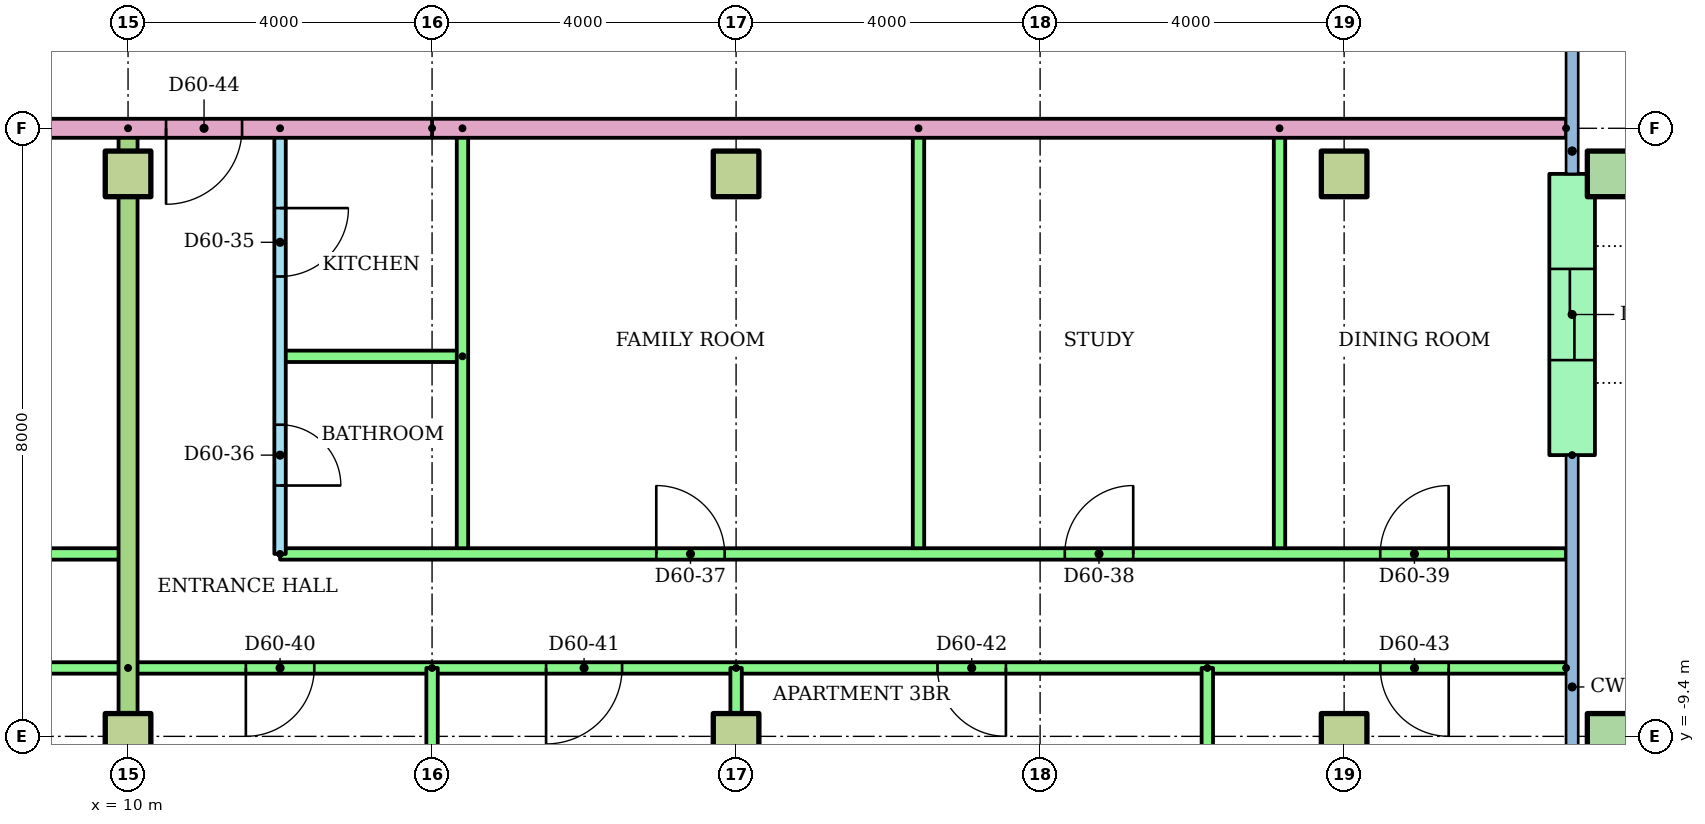
"""IFC4 building model, lengths in metres.
Left out: names, types, materials, properties, quantities, classifications, styles, units other than length and angle.
Written with IfcOpenShell. Run it as: python <this file> out.ifc"""

import sys

from ifc_helpers import new_model, si_unit, direction, frame, frame_2d, origin, origin_2d, place, context, subcontext, project, spatial, rectangle, hollow_rectangle, extrude, element, fill, save


model = new_model("IFC4")
c1 = context("Model", 3, precision=1e-05, world=origin(), true_north=direction((0.0, 1.0)))
c2 = subcontext(c1, "Body", "Model", "MODEL_VIEW")
j1 = project(units=[si_unit("LENGTHUNIT", "METRE"), si_unit("PLANEANGLEUNIT", "RADIAN")], contexts=[c1])
p1 = place(None, origin())
s1 = spatial("IfcSite", under=j1, at=p1, CompositionType="ELEMENT")
p2 = place(p1, origin())
s2 = spatial("IfcBuilding", under=s1, at=p2, CompositionType="ELEMENT")
p3 = place(p2, frame((0.0, 0.0, 230.0)))
s3 = spatial("IfcBuildingStorey", under=s2, at=p3, CompositionType="ELEMENT", Elevation=230.0)
for number, where in (
    (1, (10.0, -9.4, 0.0)),
    (2, (18.0, -9.4, 0.0)),
    (3, (26.0, -9.4, 0.0)),
):
    element("IfcColumn", number, at=place(p3, frame(where)), inside=s3, PredefinedType="COLUMN", context=c2, shape_type="SweptSolid", body=[
        extrude(rectangle(XDim=0.6, YDim=0.6, at=origin_2d()), origin(), (0.0, 0.0, 1.0), 3.2),
    ])
p4 = place(p3, frame((29.5, -9.4, 0.0)))
e4 = element("IfcColumn", 4, at=p4, inside=s3, PredefinedType="COLUMN", context=c2, shape_type="SweptSolid", body=[
    extrude(hollow_rectangle(XDim=0.6, YDim=0.6, WallThickness=0.03, at=origin_2d()), origin(), (0.0, 0.0, 1.0), 3.2),
])
for number, where in (
    (5, (10.0, -2.0, 0.0)),
    (6, (18.0, -2.0, 0.0)),
    (7, (26.0, -2.0, 0.0)),
):
    element("IfcColumn", number, at=place(p3, frame(where)), inside=s3, PredefinedType="COLUMN", context=c2, shape_type="SweptSolid", body=[
        extrude(rectangle(XDim=0.6, YDim=0.6, at=origin_2d()), origin(), (0.0, 0.0, 1.0), 3.2),
    ])
p5 = place(p3, frame((29.5, -2.0, 0.0)))
e8 = element("IfcColumn", 8, at=p5, inside=s3, PredefinedType="COLUMN", context=c2, shape_type="SweptSolid", body=[
    extrude(hollow_rectangle(XDim=0.6, YDim=0.6, WallThickness=0.03, at=origin_2d()), origin(), (0.0, 0.0, 1.0), 3.2),
])
p6 = place(p3, frame((29.0, -5.7, 0.0), z_axis=(0.0, 0.0, 1.0), x_axis=(0.0, 1.0, 0.0)))
e9 = element("IfcWall", 9, at=p6, inside=s3, PredefinedType="STANDARD", context=c2, shape_type="SweptSolid", body=[
    extrude(rectangle(XDim=3.7, YDim=0.6, at=frame_2d((1.85, 0.0))), origin(), (0.0, 0.0, 1.0), 2.92),
])
p7 = place(p6, frame((1.25, 0.0, 0.0)))
e10 = element("IfcOpeningElement", 10, at=p7, cuts=e9, PredefinedType="OPENING", context=c2, shape_type="SweptSolid", body=[
    extrude(rectangle(XDim=1.2, YDim=2.1, at=frame_2d((0.6, 1.05))), frame((0.0, 0.31, 0.0), z_axis=(0.0, -1.0, 0.0), x_axis=(1.0, 0.0, 0.0)), (0.0, 0.0, 1.0), 0.62),
])
p8 = place(p3, frame((-4.0, -7.0, 0.0)))
e11 = element("IfcWall", 11, at=p8, inside=s3, PredefinedType="PARTITIONING", context=c2, shape_type="SweptSolid", body=[
    extrude(rectangle(XDim=14.0, YDim=0.15, at=frame_2d((7.0, 0.0))), origin(), (0.0, 0.0, 1.0), 2.4),
])
p9 = place(p8, frame((4.325, 0.0, 0.0)))
e12 = element("IfcOpeningElement", 12, at=p9, cuts=e11, PredefinedType="OPENING", context=c2, shape_type="SweptSolid", body=[
    extrude(rectangle(XDim=0.9, YDim=2.1, at=frame_2d((0.45, 1.05))), frame((0.0, 0.085, 0.0), z_axis=(0.0, -1.0, 0.0), x_axis=(1.0, 0.0, 0.0)), (0.0, 0.0, 1.0), 0.17),
])
p10 = place(p8, frame((8.575, 0.0, 0.0)))
e13 = element("IfcOpeningElement", 13, at=p10, cuts=e11, PredefinedType="OPENING", context=c2, shape_type="SweptSolid", body=[
    extrude(rectangle(XDim=0.9, YDim=2.1, at=frame_2d((0.45, 1.05))), frame((0.0, 0.085, 0.0), z_axis=(0.0, -1.0, 0.0), x_axis=(1.0, 0.0, 0.0)), (0.0, 0.0, 1.0), 0.17),
])
p11 = place(p8, frame((12.0, 0.0, 0.0)))
e14 = element("IfcOpeningElement", 14, at=p11, cuts=e11, PredefinedType="OPENING", context=c2, shape_type="SweptSolid", body=[
    extrude(rectangle(XDim=0.9, YDim=2.1, at=frame_2d((0.45, 1.05))), frame((0.0, 0.085, 0.0), z_axis=(0.0, -1.0, 0.0), x_axis=(1.0, 0.0, 0.0)), (0.0, 0.0, 1.0), 0.17),
])
p12 = place(p3, frame((10.0, -8.5, 0.0), z_axis=(0.0, 0.0, 1.0), x_axis=(-1.0, 0.0, 0.0)))
e15 = element("IfcWall", 15, at=p12, inside=s3, PredefinedType="PARTITIONING", context=c2, shape_type="SweptSolid", body=[
    extrude(rectangle(XDim=16.0, YDim=0.15, at=frame_2d((8.0, 0.0))), origin(), (0.0, 0.0, 1.0), 2.4),
])
p13 = place(p12, frame((13.55, 0.0, 0.0)))
e16 = element("IfcOpeningElement", 16, at=p13, cuts=e15, PredefinedType="OPENING", context=c2, shape_type="SweptSolid", body=[
    extrude(rectangle(XDim=0.9, YDim=2.1, at=frame_2d((0.45, 1.05))), frame((0.0, 0.085, 0.0), z_axis=(0.0, -1.0, 0.0), x_axis=(1.0, 0.0, 0.0)), (0.0, 0.0, 1.0), 0.17),
])
p14 = place(p12, frame((9.5, 0.0, 0.0)))
e17 = element("IfcOpeningElement", 17, at=p14, cuts=e15, PredefinedType="OPENING", context=c2, shape_type="SweptSolid", body=[
    extrude(rectangle(XDim=1.0, YDim=2.1, at=frame_2d((0.5, 1.05))), frame((0.0, 0.085, 0.0), z_axis=(0.0, -1.0, 0.0), x_axis=(1.0, 0.0, 0.0)), (0.0, 0.0, 1.0), 0.17),
])
p15 = place(p12, frame((5.55, 0.0, 0.0)))
e18 = element("IfcOpeningElement", 18, at=p15, cuts=e15, PredefinedType="OPENING", context=c2, shape_type="SweptSolid", body=[
    extrude(rectangle(XDim=0.9, YDim=2.1, at=frame_2d((0.45, 1.05))), frame((0.0, 0.085, 0.0), z_axis=(0.0, -1.0, 0.0), x_axis=(1.0, 0.0, 0.0)), (0.0, 0.0, 1.0), 0.17),
])
p16 = place(p12, frame((1.55, 0.0, 0.0)))
e19 = element("IfcOpeningElement", 19, at=p16, cuts=e15, PredefinedType="OPENING", context=c2, shape_type="SweptSolid", body=[
    extrude(rectangle(XDim=0.9, YDim=2.1, at=frame_2d((0.45, 1.05))), frame((0.0, 0.085, 0.0), z_axis=(0.0, -1.0, 0.0), x_axis=(1.0, 0.0, 0.0)), (0.0, 0.0, 1.0), 0.17),
])
p17 = place(p3, frame((12.0, -1.4, 0.0), z_axis=(0.0, 0.0, 1.0), x_axis=(0.0, -1.0, 0.0)))
e20 = element("IfcWall", 20, at=p17, inside=s3, PredefinedType="PARTITIONING", context=c2, shape_type="SweptSolid", body=[
    extrude(rectangle(XDim=5.6, YDim=0.15, at=frame_2d((2.8, 0.0))), origin(), (0.0, 0.0, 1.0), 2.4),
])
p18 = place(p17, frame((1.05, 0.0, 0.0)))
e21 = element("IfcOpeningElement", 21, at=p18, cuts=e20, PredefinedType="OPENING", context=c2, shape_type="SweptSolid", body=[
    extrude(rectangle(XDim=0.9, YDim=2.1, at=frame_2d((0.45, 1.05))), frame((0.0, 0.085, 0.0), z_axis=(0.0, -1.0, 0.0), x_axis=(1.0, 0.0, 0.0)), (0.0, 0.0, 1.0), 0.17),
])
p19 = place(p17, frame((3.9, 0.0, 0.0)))
e22 = element("IfcOpeningElement", 22, at=p19, cuts=e20, PredefinedType="OPENING", context=c2, shape_type="SweptSolid", body=[
    extrude(rectangle(XDim=0.8, YDim=2.1, at=frame_2d((0.4, 1.05))), frame((0.0, 0.085, 0.0), z_axis=(0.0, -1.0, 0.0), x_axis=(1.0, 0.0, 0.0)), (0.0, 0.0, 1.0), 0.17),
])
p20 = place(p3, frame((14.4, -4.4, 0.0), z_axis=(0.0, 0.0, 1.0), x_axis=(-1.0, 0.0, 0.0)))
e23 = element("IfcWall", 23, at=p20, inside=s3, PredefinedType="PARTITIONING", context=c2, shape_type="SweptSolid", body=[
    extrude(rectangle(XDim=2.4, YDim=0.15, at=frame_2d((1.2, 0.0))), origin(), (0.0, 0.0, 1.0), 2.4),
])
for number, where, z_axis, x_axis in (
    (24, (14.4, -1.4, 0.0), (0.0, 0.0, 1.0), (0.0, -1.0, 0.0)),
    (25, (20.4, -1.4, 0.0), (0.0, 0.0, 1.0), (0.0, -1.0, 0.0)),
    (26, (25.15, -1.4, 0.0), (0.0, 0.0, 1.0), (0.0, -1.0, 0.0)),
):
    element("IfcWall", number, at=place(p3, frame(where, z_axis=z_axis, x_axis=x_axis)), inside=s3, PredefinedType="PARTITIONING", context=c2, shape_type="SweptSolid", body=[
        extrude(rectangle(XDim=5.6, YDim=0.15, at=frame_2d((2.8, 0.0))), origin(), (0.0, 0.0, 1.0), 2.4),
    ])
p21 = place(p3, frame((12.0, -7.0, 0.0)))
e27 = element("IfcWall", 27, at=p21, inside=s3, PredefinedType="PARTITIONING", context=c2, shape_type="SweptSolid", body=[
    extrude(rectangle(XDim=16.92, YDim=0.15, at=frame_2d((8.46, 0.0))), origin(), (0.0, 0.0, 1.0), 2.4),
])
p22 = place(p21, frame((4.95, 0.0, 0.0)))
e28 = element("IfcOpeningElement", 28, at=p22, cuts=e27, PredefinedType="OPENING", context=c2, shape_type="SweptSolid", body=[
    extrude(rectangle(XDim=0.9, YDim=2.1, at=frame_2d((0.45, 1.05))), frame((0.0, 0.085, 0.0), z_axis=(0.0, -1.0, 0.0), x_axis=(1.0, 0.0, 0.0)), (0.0, 0.0, 1.0), 0.17),
])
p23 = place(p21, frame((10.325, 0.0, 0.0)))
e29 = element("IfcOpeningElement", 29, at=p23, cuts=e27, PredefinedType="OPENING", context=c2, shape_type="SweptSolid", body=[
    extrude(rectangle(XDim=0.9, YDim=2.1, at=frame_2d((0.45, 1.05))), frame((0.0, 0.085, 0.0), z_axis=(0.0, -1.0, 0.0), x_axis=(1.0, 0.0, 0.0)), (0.0, 0.0, 1.0), 0.17),
])
p24 = place(p21, frame((14.475, 0.0, 0.0)))
e30 = element("IfcOpeningElement", 30, at=p24, cuts=e27, PredefinedType="OPENING", context=c2, shape_type="SweptSolid", body=[
    extrude(rectangle(XDim=0.9, YDim=2.1, at=frame_2d((0.45, 1.05))), frame((0.0, 0.085, 0.0), z_axis=(0.0, -1.0, 0.0), x_axis=(1.0, 0.0, 0.0)), (0.0, 0.0, 1.0), 0.17),
])
p25 = place(p3, frame((28.92, -8.5, 0.0), z_axis=(0.0, 0.0, 1.0), x_axis=(-1.0, 0.0, 0.0)))
e31 = element("IfcWall", 31, at=p25, inside=s3, PredefinedType="PARTITIONING", context=c2, shape_type="SweptSolid", body=[
    extrude(rectangle(XDim=18.92, YDim=0.15, at=frame_2d((9.46, 0.0))), origin(), (0.0, 0.0, 1.0), 2.4),
])
p26 = place(p25, frame((16.47, 0.0, 0.0)))
e32 = element("IfcOpeningElement", 32, at=p26, cuts=e31, PredefinedType="OPENING", context=c2, shape_type="SweptSolid", body=[
    extrude(rectangle(XDim=0.9, YDim=2.1, at=frame_2d((0.45, 1.05))), frame((0.0, 0.085, 0.0), z_axis=(0.0, -1.0, 0.0), x_axis=(1.0, 0.0, 0.0)), (0.0, 0.0, 1.0), 0.17),
])
p27 = place(p25, frame((12.42, 0.0, 0.0)))
e33 = element("IfcOpeningElement", 33, at=p27, cuts=e31, PredefinedType="OPENING", context=c2, shape_type="SweptSolid", body=[
    extrude(rectangle(XDim=1.0, YDim=2.1, at=frame_2d((0.5, 1.05))), frame((0.0, 0.085, 0.0), z_axis=(0.0, -1.0, 0.0), x_axis=(1.0, 0.0, 0.0)), (0.0, 0.0, 1.0), 0.17),
])
p28 = place(p25, frame((7.37, 0.0, 0.0)))
e34 = element("IfcOpeningElement", 34, at=p28, cuts=e31, PredefinedType="OPENING", context=c2, shape_type="SweptSolid", body=[
    extrude(rectangle(XDim=0.9, YDim=2.1, at=frame_2d((0.45, 1.05))), frame((0.0, 0.085, 0.0), z_axis=(0.0, -1.0, 0.0), x_axis=(1.0, 0.0, 0.0)), (0.0, 0.0, 1.0), 0.17),
])
p29 = place(p25, frame((1.544, 0.0, 0.0)))
e35 = element("IfcOpeningElement", 35, at=p29, cuts=e31, PredefinedType="OPENING", context=c2, shape_type="SweptSolid", body=[
    extrude(rectangle(XDim=0.9, YDim=2.1, at=frame_2d((0.45, 1.05))), frame((0.0, 0.085, 0.0), z_axis=(0.0, -1.0, 0.0), x_axis=(1.0, 0.0, 0.0)), (0.0, 0.0, 1.0), 0.17),
])
p30 = place(p3, frame((14.0, -8.5, 0.0), z_axis=(0.0, 0.0, 1.0), x_axis=(0.0, -1.0, 0.0)))
e36 = element("IfcWall", 36, at=p30, inside=s3, PredefinedType="PARTITIONING", context=c2, shape_type="SweptSolid", body=[
    extrude(rectangle(XDim=8.021, YDim=0.15, at=frame_2d((4.01, 0.0))), origin(), (0.0, 0.0, 1.0), 2.4),
])
p31 = place(p3, frame((18.0, -8.5, 0.0), z_axis=(0.0, 0.0, 1.0), x_axis=(0.0, -1.0, 0.0)))
e37 = element("IfcWall", 37, at=p31, inside=s3, PredefinedType="PARTITIONING", context=c2, shape_type="SweptSolid", body=[
    extrude(rectangle(XDim=8.01, YDim=0.15, at=frame_2d((4.005, 0.0))), origin(), (0.0, 0.0, 1.0), 2.4),
])
p32 = place(p3, frame((24.2, -8.5, 0.0), z_axis=(0.0, 0.0, 1.0), x_axis=(0.0, -1.0, 0.0)))
e38 = element("IfcWall", 38, at=p32, inside=s3, PredefinedType="PARTITIONING", context=c2, shape_type="SweptSolid", body=[
    extrude(rectangle(XDim=6.22, YDim=0.15, at=frame_2d((3.11, 0.0))), origin(), (0.0, 0.0, 1.0), 2.4),
])
p33 = place(p3, frame((10.0, -1.4, 0.0), z_axis=(0.0, 0.0, 1.0), x_axis=(0.0, -1.0, 0.0)))
e39 = element("IfcWall", 39, at=p33, inside=s3, PredefinedType="PARTITIONING", context=c2, shape_type="SweptSolid", body=[
    extrude(rectangle(XDim=15.11, YDim=0.25, at=frame_2d((7.555, 0.0))), origin(), (0.0, 0.0, 1.0), 2.4),
])
p34 = place(p3, frame((28.92, -1.4, 0.0), z_axis=(0.0, 0.0, 1.0), x_axis=(-1.0, 0.0, 0.0)))
e40 = element("IfcWall", 40, at=p34, inside=s3, PredefinedType="PARTITIONING", context=c2, shape_type="SweptSolid", body=[
    extrude(rectangle(XDim=14.92, YDim=0.25, at=frame_2d((7.46, 0.0))), origin(), (0.0, 0.0, 1.0), 2.4),
])
p35 = place(p3, frame((14.0, -1.4, 0.0), z_axis=(0.0, 0.0, 1.0), x_axis=(-1.0, 0.0, 0.0)))
e41 = element("IfcWall", 41, at=p35, inside=s3, PredefinedType="PARTITIONING", context=c2, shape_type="SweptSolid", body=[
    extrude(rectangle(XDim=28.0, YDim=0.25, at=frame_2d((14.0, 0.0))), origin(), (0.0, 0.0, 1.0), 2.4),
])
p36 = place(p35, frame((20.5, 0.0, 0.0)))
e42 = element("IfcOpeningElement", 42, at=p36, cuts=e41, PredefinedType="OPENING", context=c2, shape_type="SweptSolid", body=[
    extrude(rectangle(XDim=1.0, YDim=2.1, at=frame_2d((0.5, 1.05))), frame((0.0, 0.135, 0.0), z_axis=(0.0, -1.0, 0.0), x_axis=(1.0, 0.0, 0.0)), (0.0, 0.0, 1.0), 0.27),
])
p37 = place(p35, frame((18.5, 0.0, 0.0)))
e43 = element("IfcOpeningElement", 43, at=p37, cuts=e41, PredefinedType="OPENING", context=c2, shape_type="SweptSolid", body=[
    extrude(rectangle(XDim=1.0, YDim=2.1, at=frame_2d((0.5, 1.05))), frame((0.0, 0.135, 0.0), z_axis=(0.0, -1.0, 0.0), x_axis=(1.0, 0.0, 0.0)), (0.0, 0.0, 1.0), 0.27),
])
p38 = place(p35, frame((2.5, 0.0, 0.0)))
e44 = element("IfcOpeningElement", 44, at=p38, cuts=e41, PredefinedType="OPENING", context=c2, shape_type="SweptSolid", body=[
    extrude(rectangle(XDim=1.0, YDim=2.1, at=frame_2d((0.5, 1.05))), frame((0.0, 0.135, 0.0), z_axis=(0.0, -1.0, 0.0), x_axis=(1.0, 0.0, 0.0)), (0.0, 0.0, 1.0), 0.27),
])
p39 = place(p18, origin())
e45 = element("IfcDoor", 45, at=p39, inside=s3, OperationType="SINGLE_SWING_LEFT", PredefinedType="DOOR", context=c2, shape_type="SweptSolid", body=[
    extrude(rectangle(XDim=0.9, YDim=2.1, at=frame_2d((0.45, 1.05))), frame((0.0, 0.025, 0.0), z_axis=(0.0, -1.0, 0.0), x_axis=(1.0, 0.0, 0.0)), (0.0, 0.0, 1.0), 0.05),
])
fill(e21, e45)
p40 = place(p19, origin())
e46 = element("IfcDoor", 46, at=p40, inside=s3, OperationType="SINGLE_SWING_RIGHT", PredefinedType="DOOR", context=c2, shape_type="SweptSolid", body=[
    extrude(rectangle(XDim=0.8, YDim=2.1, at=frame_2d((0.4, 1.05))), frame((0.0, 0.025, 0.0), z_axis=(0.0, -1.0, 0.0), x_axis=(1.0, 0.0, 0.0)), (0.0, 0.0, 1.0), 0.05),
])
fill(e22, e46)
p41 = place(p22, origin())
e47 = element("IfcDoor", 47, at=p41, inside=s3, OperationType="SINGLE_SWING_LEFT", PredefinedType="DOOR", context=c2, shape_type="SweptSolid", body=[
    extrude(rectangle(XDim=0.9, YDim=2.1, at=frame_2d((0.45, 1.05))), frame((0.0, 0.025, 0.0), z_axis=(0.0, -1.0, 0.0), x_axis=(1.0, 0.0, 0.0)), (0.0, 0.0, 1.0), 0.05),
])
fill(e28, e47)
p42 = place(p23, origin())
e48 = element("IfcDoor", 48, at=p42, inside=s3, OperationType="SINGLE_SWING_RIGHT", PredefinedType="DOOR", context=c2, shape_type="SweptSolid", body=[
    extrude(rectangle(XDim=0.9, YDim=2.1, at=frame_2d((0.45, 1.05))), frame((0.0, 0.025, 0.0), z_axis=(0.0, -1.0, 0.0), x_axis=(1.0, 0.0, 0.0)), (0.0, 0.0, 1.0), 0.05),
])
fill(e29, e48)
p43 = place(p24, origin())
e49 = element("IfcDoor", 49, at=p43, inside=s3, OperationType="SINGLE_SWING_RIGHT", PredefinedType="DOOR", context=c2, shape_type="SweptSolid", body=[
    extrude(rectangle(XDim=0.9, YDim=2.1, at=frame_2d((0.45, 1.05))), frame((0.0, 0.025, 0.0), z_axis=(0.0, -1.0, 0.0), x_axis=(1.0, 0.0, 0.0)), (0.0, 0.0, 1.0), 0.05),
])
fill(e30, e49)
p44 = place(p26, origin())
e50 = element("IfcDoor", 50, at=p44, inside=s3, OperationType="SINGLE_SWING_RIGHT", PredefinedType="DOOR", context=c2, shape_type="SweptSolid", body=[
    extrude(rectangle(XDim=0.9, YDim=2.1, at=frame_2d((0.45, 1.05))), frame((0.0, 0.025, 0.0), z_axis=(0.0, -1.0, 0.0), x_axis=(1.0, 0.0, 0.0)), (0.0, 0.0, 1.0), 0.05),
])
fill(e32, e50)
p45 = place(p27, origin())
e51 = element("IfcDoor", 51, at=p45, inside=s3, OperationType="SINGLE_SWING_RIGHT", PredefinedType="DOOR", context=c2, shape_type="SweptSolid", body=[
    extrude(rectangle(XDim=1.0, YDim=2.1, at=frame_2d((0.5, 1.05))), frame((0.0, 0.025, 0.0), z_axis=(0.0, -1.0, 0.0), x_axis=(1.0, 0.0, 0.0)), (0.0, 0.0, 1.0), 0.05),
])
fill(e33, e51)
p46 = place(p28, origin())
e52 = element("IfcDoor", 52, at=p46, inside=s3, OperationType="SINGLE_SWING_LEFT", PredefinedType="DOOR", context=c2, shape_type="SweptSolid", body=[
    extrude(rectangle(XDim=0.9, YDim=2.1, at=frame_2d((0.45, 1.05))), frame((0.0, 0.025, 0.0), z_axis=(0.0, -1.0, 0.0), x_axis=(1.0, 0.0, 0.0)), (0.0, 0.0, 1.0), 0.05),
])
fill(e34, e52)
p47 = place(p29, origin())
e53 = element("IfcDoor", 53, at=p47, inside=s3, OperationType="SINGLE_SWING_LEFT", PredefinedType="DOOR", context=c2, shape_type="SweptSolid", body=[
    extrude(rectangle(XDim=0.9, YDim=2.1, at=frame_2d((0.45, 1.05))), frame((0.0, 0.025, 0.0), z_axis=(0.0, -1.0, 0.0), x_axis=(1.0, 0.0, 0.0)), (0.0, 0.0, 1.0), 0.05),
])
fill(e35, e53)
p48 = place(p38, origin())
e54 = element("IfcDoor", 54, at=p48, inside=s3, OperationType="SINGLE_SWING_RIGHT", PredefinedType="DOOR", context=c2, shape_type="SweptSolid", body=[
    extrude(rectangle(XDim=1.0, YDim=2.1, at=frame_2d((0.5, 1.05))), frame((0.0, 0.025, 0.0), z_axis=(0.0, -1.0, 0.0), x_axis=(1.0, 0.0, 0.0)), (0.0, 0.0, 1.0), 0.05),
])
fill(e44, e54)
p49 = place(p7, origin())
e55 = element("IfcDoor", 55, at=p49, inside=s3, OperationType="SLIDING_TO_LEFT", PredefinedType="DOOR", context=c2, shape_type="SweptSolid", body=[
    extrude(rectangle(XDim=1.2, YDim=2.1, at=frame_2d((0.6, 1.05))), frame((0.0, 0.025, 0.0), z_axis=(0.0, -1.0, 0.0), x_axis=(1.0, 0.0, 0.0)), (0.0, 0.0, 1.0), 0.05),
])
fill(e10, e55)
save(model, sys.argv[1])
